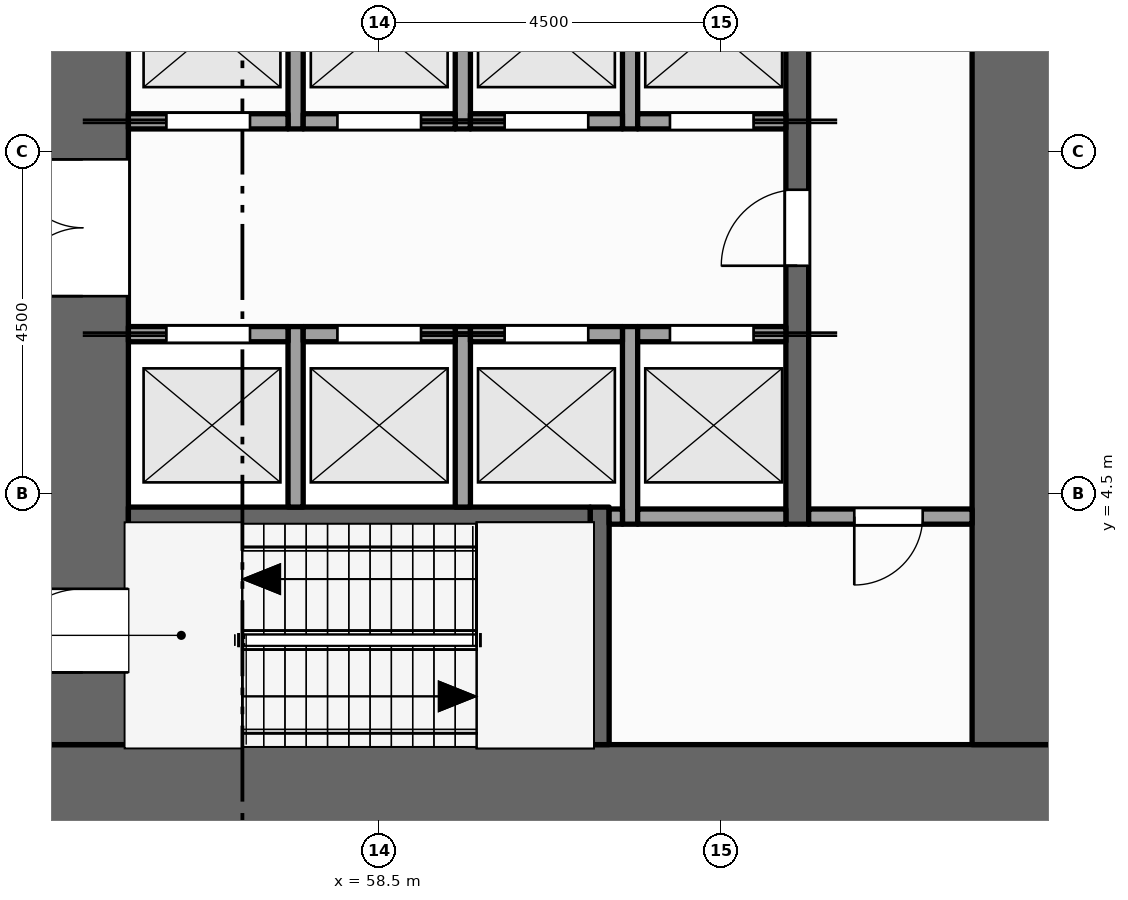
"""IFC4 building model, lengths in metres.
Left out: names, types, materials, properties, quantities, classifications, styles, units other than length and angle.
Written with IfcOpenShell. Run it as: python <this file> out.ifc"""

import sys

from ifc_helpers import new_model, si_unit, direction, frame, frame_2d, origin, place, context, subcontext, project, spatial, rectangle, extrude, element, fill, save


model = new_model("IFC4")
c1 = context("Model", 3, precision=1e-05, world=origin(), true_north=direction((0.0, 1.0)))
c2 = subcontext(c1, "Body", "Model", "MODEL_VIEW")
j1 = project(units=[si_unit("LENGTHUNIT", "METRE"), si_unit("PLANEANGLEUNIT", "RADIAN")], contexts=[c1])
p1 = place(None, origin())
s1 = spatial("IfcSite", under=j1, at=p1, CompositionType="ELEMENT")
p2 = place(p1, origin())
s2 = spatial("IfcBuilding", under=s1, at=p2, CompositionType="ELEMENT")
p3 = place(p2, frame((0.0, 0.0, 131.0)))
s3 = spatial("IfcBuildingStorey", under=s2, at=p3, CompositionType="ELEMENT", Elevation=131.0)
p4 = place(p3, frame((67.5, 0.6, -0.15), z_axis=(0.0, 0.0, 1.0), x_axis=(-1.0, 0.0, 0.0)))
e1 = element("IfcWall", 1, at=p4, inside=s3, PredefinedType="SHEAR", context=c2, shape_type="SweptSolid", body=[
    extrude(rectangle(XDim=13.5, YDim=1.2, at=frame_2d((6.75, 0.0))), origin(), (0.0, 0.0, 1.0), 8.0),
])
p5 = place(p3, frame((54.6, 1.2, -0.15), z_axis=(0.0, 0.0, 1.0), x_axis=(0.0, 1.0, 0.0)))
e2 = element("IfcWall", 2, at=p5, inside=s3, PredefinedType="SHEAR", context=c2, shape_type="SweptSolid", body=[
    extrude(rectangle(XDim=20.1, YDim=1.2, at=frame_2d((10.05, 0.0))), origin(), (0.0, 0.0, 1.0), 8.0),
])
p6 = place(p5, frame((5.9, 0.0, 0.15)))
e3 = element("IfcOpeningElement", 3, at=p6, cuts=e2, PredefinedType="OPENING", context=c2, shape_type="SweptSolid", body=[
    extrude(rectangle(XDim=1.8, YDim=2.1, at=frame_2d((0.9, 1.05))), frame((0.0, 0.61, 0.0), z_axis=(0.0, -1.0, 0.0), x_axis=(1.0, 0.0, 0.0)), (0.0, 0.0, 1.0), 1.22),
])
p7 = place(p5, frame((11.95, 0.0, 0.15)))
e4 = element("IfcOpeningElement", 4, at=p7, cuts=e2, PredefinedType="OPENING", context=c2, shape_type="SweptSolid", body=[
    extrude(rectangle(XDim=1.1, YDim=2.1, at=frame_2d((0.55, 1.05))), frame((0.0, 0.61, 0.0), z_axis=(0.0, -1.0, 0.0), x_axis=(1.0, 0.0, 0.0)), (0.0, 0.0, 1.0), 1.22),
])
p8 = place(p5, frame((0.95, 0.0, 0.15)))
e5 = element("IfcOpeningElement", 5, at=p8, cuts=e2, PredefinedType="OPENING", context=c2, shape_type="SweptSolid", body=[
    extrude(rectangle(XDim=1.1, YDim=2.1, at=frame_2d((0.55, 1.05))), frame((0.0, 0.61, 0.0), z_axis=(0.0, -1.0, 0.0), x_axis=(1.0, 0.0, 0.0)), (0.0, 0.0, 1.0), 1.22),
])
p9 = place(p5, frame((18.15, 0.0, 0.15)))
e6 = element("IfcOpeningElement", 6, at=p9, cuts=e2, PredefinedType="OPENING", context=c2, shape_type="SweptSolid", body=[
    extrude(rectangle(XDim=1.1, YDim=2.1, at=frame_2d((0.55, 1.05))), frame((0.0, 0.61, 0.0), z_axis=(0.0, -1.0, 0.0), x_axis=(1.0, 0.0, 0.0)), (0.0, 0.0, 1.0), 1.22),
])
p10 = place(p3, frame((66.9, 1.2, -0.15), z_axis=(0.0, 0.0, 1.0), x_axis=(0.0, 1.0, 0.0)))
e7 = element("IfcWall", 7, at=p10, inside=s3, PredefinedType="SHEAR", context=c2, shape_type="SweptSolid", body=[
    extrude(rectangle(XDim=20.1, YDim=1.2, at=frame_2d((10.05, 0.0))), origin(), (0.0, 0.0, 1.0), 8.0),
])
p11 = place(p3, frame((57.4, 4.325, 0.0), z_axis=(0.0, 0.0, 1.0), x_axis=(0.0, 1.0, 0.0)))
e8 = element("IfcWall", 8, at=p11, inside=s3, PredefinedType="SOLIDWALL", context=c2, shape_type="SweptSolid", body=[
    extrude(rectangle(XDim=2.375, YDim=0.2, at=frame_2d((1.188, 0.0))), origin(), (0.0, 0.0, 1.0), 7.85),
])
p12 = place(p3, frame((57.4, 9.3, 0.0), z_axis=(0.0, 0.0, 1.0), x_axis=(0.0, 1.0, 0.0)))
e9 = element("IfcWall", 9, at=p12, inside=s3, PredefinedType="SOLIDWALL", context=c2, shape_type="SweptSolid", body=[
    extrude(rectangle(XDim=2.6, YDim=0.2, at=frame_2d((1.3, 0.0))), origin(), (0.0, 0.0, 1.0), 7.85),
])
p13 = place(p3, frame((59.6, 4.325, 0.0), z_axis=(0.0, 0.0, 1.0), x_axis=(0.0, 1.0, 0.0)))
e10 = element("IfcWall", 10, at=p13, inside=s3, PredefinedType="SOLIDWALL", context=c2, shape_type="SweptSolid", body=[
    extrude(rectangle(XDim=2.375, YDim=0.2, at=frame_2d((1.188, 0.0))), origin(), (0.0, 0.0, 1.0), 7.85),
])
p14 = place(p3, frame((59.6, 9.3, 0.0), z_axis=(0.0, 0.0, 1.0), x_axis=(0.0, 1.0, 0.0)))
e11 = element("IfcWall", 11, at=p14, inside=s3, PredefinedType="SOLIDWALL", context=c2, shape_type="SweptSolid", body=[
    extrude(rectangle(XDim=2.6, YDim=0.2, at=frame_2d((1.3, 0.0))), origin(), (0.0, 0.0, 1.0), 7.85),
])
p15 = place(p3, frame((61.4, 1.2, 0.0), z_axis=(0.0, 0.0, 1.0), x_axis=(0.0, 1.0, 0.0)))
e12 = element("IfcWall", 12, at=p15, inside=s3, PredefinedType="SHEAR", context=c2, shape_type="SweptSolid", body=[
    extrude(rectangle(XDim=3.125, YDim=0.25, at=frame_2d((1.562, 0.0))), origin(), (0.0, 0.0, 1.0), 7.85),
])
for number, where, z_axis, x_axis in (
    (13, (61.8, 4.1, 0.0), (0.0, 0.0, 1.0), (0.0, 1.0, 0.0)),
    (14, (61.8, 9.3, 0.0), (0.0, 0.0, 1.0), (0.0, 1.0, 0.0)),
):
    element("IfcWall", number, at=place(p3, frame(where, z_axis=z_axis, x_axis=x_axis)), inside=s3, PredefinedType="SOLIDWALL", context=c2, shape_type="SweptSolid", body=[
        extrude(rectangle(XDim=2.6, YDim=0.2, at=frame_2d((1.3, 0.0))), origin(), (0.0, 0.0, 1.0), 7.85),
    ])
p16 = place(p3, frame((64.0, 4.1, 0.0), z_axis=(0.0, 0.0, 1.0), x_axis=(0.0, 1.0, 0.0)))
e15 = element("IfcWall", 15, at=p16, inside=s3, PredefinedType="SHEAR", context=c2, shape_type="SweptSolid", body=[
    extrude(rectangle(XDim=14.5, YDim=0.3, at=frame_2d((7.25, 0.0))), origin(), (0.0, 0.0, 1.0), 7.85),
])
p17 = place(p16, frame((3.4, 0.0, 0.0)))
e16 = element("IfcOpeningElement", 16, at=p17, cuts=e15, PredefinedType="OPENING", context=c2, shape_type="SweptSolid", body=[
    extrude(rectangle(XDim=1.0, YDim=2.1, at=frame_2d((0.5, 1.05))), frame((0.0, 0.16, 0.0), z_axis=(0.0, -1.0, 0.0), x_axis=(1.0, 0.0, 0.0)), (0.0, 0.0, 1.0), 0.32),
])
p18 = place(p16, frame((9.1, 0.0, 0.0)))
e17 = element("IfcOpeningElement", 17, at=p18, cuts=e15, PredefinedType="OPENING", context=c2, shape_type="SweptSolid", body=[
    extrude(rectangle(XDim=1.0, YDim=2.1, at=frame_2d((0.5, 1.05))), frame((0.0, 0.16, 0.0), z_axis=(0.0, -1.0, 0.0), x_axis=(1.0, 0.0, 0.0)), (0.0, 0.0, 1.0), 0.32),
])
p19 = place(p3, frame((55.2, 4.2, 0.0), z_axis=(0.0, 0.0, 1.0), x_axis=(1.0, 0.0, 0.0)))
e18 = element("IfcWall", 18, at=p19, inside=s3, PredefinedType="SHEAR", context=c2, shape_type="SweptSolid", body=[
    extrude(rectangle(XDim=6.075, YDim=0.25, at=frame_2d((3.038, 0.0))), origin(), (0.0, 0.0, 1.0), 7.85),
])
p20 = place(p3, frame((61.525, 4.2, 0.0), z_axis=(0.0, 0.0, 1.0), x_axis=(1.0, 0.0, 0.0)))
e19 = element("IfcWall", 19, at=p20, inside=s3, PredefinedType="SOLIDWALL", context=c2, shape_type="SweptSolid", body=[
    extrude(rectangle(XDim=0.175, YDim=0.2, at=frame_2d((0.087, 0.0))), origin(), (0.0, 0.0, 1.0), 7.85),
])
p21 = place(p3, frame((61.9, 4.2, 0.0), z_axis=(0.0, 0.0, 1.0), x_axis=(1.0, 0.0, 0.0)))
e20 = element("IfcWall", 20, at=p21, inside=s3, PredefinedType="SOLIDWALL", context=c2, shape_type="SweptSolid", body=[
    extrude(rectangle(XDim=1.95, YDim=0.2, at=frame_2d((0.975, 0.0))), origin(), (0.0, 0.0, 1.0), 7.85),
])
p22 = place(p3, frame((64.15, 4.2, 0.0), z_axis=(0.0, 0.0, 1.0), x_axis=(1.0, 0.0, 0.0)))
e21 = element("IfcWall", 21, at=p22, inside=s3, PredefinedType="PARTITIONING", context=c2, shape_type="SweptSolid", body=[
    extrude(rectangle(XDim=2.15, YDim=0.2, at=frame_2d((1.075, 0.0))), origin(), (0.0, 0.0, 1.0), 7.85),
])
p23 = place(p22, frame((0.6, 0.0, 0.0)))
e22 = element("IfcOpeningElement", 22, at=p23, cuts=e21, PredefinedType="OPENING", context=c2, shape_type="SweptSolid", body=[
    extrude(rectangle(XDim=0.9, YDim=2.1, at=frame_2d((0.45, 1.05))), frame((0.0, 0.11, 0.0), z_axis=(0.0, -1.0, 0.0), x_axis=(1.0, 0.0, 0.0)), (0.0, 0.0, 1.0), 0.22),
])
p24 = place(p3, frame((55.2, 6.6, 0.0), z_axis=(0.0, 0.0, 1.0), x_axis=(1.0, 0.0, 0.0)))
e23 = element("IfcWall", 23, at=p24, inside=s3, PredefinedType="SOLIDWALL", context=c2, shape_type="SweptSolid", body=[
    extrude(rectangle(XDim=2.1, YDim=0.2, at=frame_2d((1.05, 0.0))), origin(), (0.0, 0.0, 1.0), 7.85),
])
p25 = place(p24, frame((0.5, 0.0, 0.012)))
e24 = element("IfcOpeningElement", 24, at=p25, cuts=e23, PredefinedType="OPENING", context=c2, shape_type="SweptSolid", body=[
    extrude(rectangle(XDim=1.1, YDim=2.1, at=frame_2d((0.55, 1.05))), frame((0.0, 0.11, 0.0), z_axis=(0.0, -1.0, 0.0), x_axis=(1.0, 0.0, 0.0)), (0.0, 0.0, 1.0), 0.22),
])
p26 = place(p3, frame((57.5, 6.6, 0.0), z_axis=(0.0, 0.0, 1.0), x_axis=(1.0, 0.0, 0.0)))
e25 = element("IfcWall", 25, at=p26, inside=s3, PredefinedType="SOLIDWALL", context=c2, shape_type="SweptSolid", body=[
    extrude(rectangle(XDim=2.0, YDim=0.2, at=frame_2d((1.0, 0.0))), origin(), (0.0, 0.0, 1.0), 7.85),
])
p27 = place(p26, frame((0.45, 0.0, 0.012)))
e26 = element("IfcOpeningElement", 26, at=p27, cuts=e25, PredefinedType="OPENING", context=c2, shape_type="SweptSolid", body=[
    extrude(rectangle(XDim=1.1, YDim=2.1, at=frame_2d((0.55, 1.05))), frame((0.0, 0.11, 0.0), z_axis=(0.0, -1.0, 0.0), x_axis=(1.0, 0.0, 0.0)), (0.0, 0.0, 1.0), 0.22),
])
p28 = place(p3, frame((59.7, 6.6, 0.0), z_axis=(0.0, 0.0, 1.0), x_axis=(1.0, 0.0, 0.0)))
e27 = element("IfcWall", 27, at=p28, inside=s3, PredefinedType="SOLIDWALL", context=c2, shape_type="SweptSolid", body=[
    extrude(rectangle(XDim=2.0, YDim=0.2, at=frame_2d((1.0, 0.0))), origin(), (0.0, 0.0, 1.0), 7.85),
])
p29 = place(p28, frame((0.45, 0.0, 0.012)))
e28 = element("IfcOpeningElement", 28, at=p29, cuts=e27, PredefinedType="OPENING", context=c2, shape_type="SweptSolid", body=[
    extrude(rectangle(XDim=1.1, YDim=2.1, at=frame_2d((0.55, 1.05))), frame((0.0, 0.11, 0.0), z_axis=(0.0, -1.0, 0.0), x_axis=(1.0, 0.0, 0.0)), (0.0, 0.0, 1.0), 0.22),
])
p30 = place(p3, frame((61.9, 6.6, 0.0), z_axis=(0.0, 0.0, 1.0), x_axis=(1.0, 0.0, 0.0)))
e29 = element("IfcWall", 29, at=p30, inside=s3, PredefinedType="SOLIDWALL", context=c2, shape_type="SweptSolid", body=[
    extrude(rectangle(XDim=1.95, YDim=0.2, at=frame_2d((0.975, 0.0))), origin(), (0.0, 0.0, 1.0), 7.85),
])
p31 = place(p30, frame((0.425, 0.0, 0.012)))
e30 = element("IfcOpeningElement", 30, at=p31, cuts=e29, PredefinedType="OPENING", context=c2, shape_type="SweptSolid", body=[
    extrude(rectangle(XDim=1.1, YDim=2.1, at=frame_2d((0.55, 1.05))), frame((0.0, 0.11, 0.0), z_axis=(0.0, -1.0, 0.0), x_axis=(1.0, 0.0, 0.0)), (0.0, 0.0, 1.0), 0.22),
])
p32 = place(p3, frame((55.2, 9.4, 0.0), z_axis=(0.0, 0.0, 1.0), x_axis=(1.0, 0.0, 0.0)))
e31 = element("IfcWall", 31, at=p32, inside=s3, PredefinedType="SOLIDWALL", context=c2, shape_type="SweptSolid", body=[
    extrude(rectangle(XDim=2.1, YDim=0.2, at=frame_2d((1.05, 0.0))), origin(), (0.0, 0.0, 1.0), 7.85),
])
p33 = place(p32, frame((0.5, 0.0, 0.012)))
e32 = element("IfcOpeningElement", 32, at=p33, cuts=e31, PredefinedType="OPENING", context=c2, shape_type="SweptSolid", body=[
    extrude(rectangle(XDim=1.1, YDim=2.1, at=frame_2d((0.55, 1.05))), frame((0.0, 0.11, 0.0), z_axis=(0.0, -1.0, 0.0), x_axis=(1.0, 0.0, 0.0)), (0.0, 0.0, 1.0), 0.22),
])
p34 = place(p3, frame((57.5, 9.4, 0.0), z_axis=(0.0, 0.0, 1.0), x_axis=(1.0, 0.0, 0.0)))
e33 = element("IfcWall", 33, at=p34, inside=s3, PredefinedType="SOLIDWALL", context=c2, shape_type="SweptSolid", body=[
    extrude(rectangle(XDim=2.0, YDim=0.2, at=frame_2d((1.0, 0.0))), origin(), (0.0, 0.0, 1.0), 7.85),
])
p35 = place(p34, frame((0.45, 0.0, 0.012)))
e34 = element("IfcOpeningElement", 34, at=p35, cuts=e33, PredefinedType="OPENING", context=c2, shape_type="SweptSolid", body=[
    extrude(rectangle(XDim=1.1, YDim=2.1, at=frame_2d((0.55, 1.05))), frame((0.0, 0.11, 0.0), z_axis=(0.0, -1.0, 0.0), x_axis=(1.0, 0.0, 0.0)), (0.0, 0.0, 1.0), 0.22),
])
p36 = place(p3, frame((59.7, 9.4, 0.0), z_axis=(0.0, 0.0, 1.0), x_axis=(1.0, 0.0, 0.0)))
e35 = element("IfcWall", 35, at=p36, inside=s3, PredefinedType="SOLIDWALL", context=c2, shape_type="SweptSolid", body=[
    extrude(rectangle(XDim=2.0, YDim=0.2, at=frame_2d((1.0, 0.0))), origin(), (0.0, 0.0, 1.0), 7.85),
])
p37 = place(p36, frame((0.45, 0.0, 0.012)))
e36 = element("IfcOpeningElement", 36, at=p37, cuts=e35, PredefinedType="OPENING", context=c2, shape_type="SweptSolid", body=[
    extrude(rectangle(XDim=1.1, YDim=2.1, at=frame_2d((0.55, 1.05))), frame((0.0, 0.11, 0.0), z_axis=(0.0, -1.0, 0.0), x_axis=(1.0, 0.0, 0.0)), (0.0, 0.0, 1.0), 0.22),
])
p38 = place(p3, frame((61.9, 9.4, 0.0), z_axis=(0.0, 0.0, 1.0), x_axis=(1.0, 0.0, 0.0)))
e37 = element("IfcWall", 37, at=p38, inside=s3, PredefinedType="SOLIDWALL", context=c2, shape_type="SweptSolid", body=[
    extrude(rectangle(XDim=1.95, YDim=0.2, at=frame_2d((0.975, 0.0))), origin(), (0.0, 0.0, 1.0), 7.85),
])
p39 = place(p38, frame((0.425, 0.0, 0.012)))
e38 = element("IfcOpeningElement", 38, at=p39, cuts=e37, PredefinedType="OPENING", context=c2, shape_type="SweptSolid", body=[
    extrude(rectangle(XDim=1.1, YDim=2.1, at=frame_2d((0.55, 1.05))), frame((0.0, 0.11, 0.0), z_axis=(0.0, -1.0, 0.0), x_axis=(1.0, 0.0, 0.0)), (0.0, 0.0, 1.0), 0.22),
])
p40 = place(p25, origin())
e39 = element("IfcDoor", 39, at=p40, inside=s3, OperationType="SLIDING_TO_LEFT", PredefinedType="DOOR", context=c2, shape_type="SweptSolid", body=[
    extrude(rectangle(XDim=1.1, YDim=2.1, at=frame_2d((0.55, 1.05))), frame((0.0, 0.025, 0.0), z_axis=(0.0, -1.0, 0.0), x_axis=(1.0, 0.0, 0.0)), (0.0, 0.0, 1.0), 0.05),
])
fill(e24, e39)
p41 = place(p27, origin())
e40 = element("IfcDoor", 40, at=p41, inside=s3, OperationType="SLIDING_TO_RIGHT", PredefinedType="DOOR", context=c2, shape_type="SweptSolid", body=[
    extrude(rectangle(XDim=1.1, YDim=2.1, at=frame_2d((0.55, 1.05))), frame((0.0, 0.025, 0.0), z_axis=(0.0, -1.0, 0.0), x_axis=(1.0, 0.0, 0.0)), (0.0, 0.0, 1.0), 0.05),
])
fill(e26, e40)
p42 = place(p29, origin())
e41 = element("IfcDoor", 41, at=p42, inside=s3, OperationType="SLIDING_TO_LEFT", PredefinedType="DOOR", context=c2, shape_type="SweptSolid", body=[
    extrude(rectangle(XDim=1.1, YDim=2.1, at=frame_2d((0.55, 1.05))), frame((0.0, 0.025, 0.0), z_axis=(0.0, -1.0, 0.0), x_axis=(1.0, 0.0, 0.0)), (0.0, 0.0, 1.0), 0.05),
])
fill(e28, e41)
p43 = place(p31, origin())
e42 = element("IfcDoor", 42, at=p43, inside=s3, OperationType="SLIDING_TO_RIGHT", PredefinedType="DOOR", context=c2, shape_type="SweptSolid", body=[
    extrude(rectangle(XDim=1.1, YDim=2.1, at=frame_2d((0.55, 1.05))), frame((0.0, 0.025, 0.0), z_axis=(0.0, -1.0, 0.0), x_axis=(1.0, 0.0, 0.0)), (0.0, 0.0, 1.0), 0.05),
])
fill(e30, e42)
p44 = place(p33, origin())
e43 = element("IfcDoor", 43, at=p44, inside=s3, OperationType="SLIDING_TO_LEFT", PredefinedType="DOOR", context=c2, shape_type="SweptSolid", body=[
    extrude(rectangle(XDim=1.1, YDim=2.1, at=frame_2d((0.55, 1.05))), frame((0.0, 0.025, 0.0), z_axis=(0.0, -1.0, 0.0), x_axis=(1.0, 0.0, 0.0)), (0.0, 0.0, 1.0), 0.05),
])
fill(e32, e43)
p45 = place(p35, origin())
e44 = element("IfcDoor", 44, at=p45, inside=s3, OperationType="SLIDING_TO_RIGHT", PredefinedType="DOOR", context=c2, shape_type="SweptSolid", body=[
    extrude(rectangle(XDim=1.1, YDim=2.1, at=frame_2d((0.55, 1.05))), frame((0.0, 0.025, 0.0), z_axis=(0.0, -1.0, 0.0), x_axis=(1.0, 0.0, 0.0)), (0.0, 0.0, 1.0), 0.05),
])
fill(e34, e44)
p46 = place(p37, origin())
e45 = element("IfcDoor", 45, at=p46, inside=s3, OperationType="SLIDING_TO_LEFT", PredefinedType="DOOR", context=c2, shape_type="SweptSolid", body=[
    extrude(rectangle(XDim=1.1, YDim=2.1, at=frame_2d((0.55, 1.05))), frame((0.0, 0.025, 0.0), z_axis=(0.0, -1.0, 0.0), x_axis=(1.0, 0.0, 0.0)), (0.0, 0.0, 1.0), 0.05),
])
fill(e36, e45)
p47 = place(p39, origin())
e46 = element("IfcDoor", 46, at=p47, inside=s3, OperationType="SLIDING_TO_RIGHT", PredefinedType="DOOR", context=c2, shape_type="SweptSolid", body=[
    extrude(rectangle(XDim=1.1, YDim=2.1, at=frame_2d((0.55, 1.05))), frame((0.0, 0.025, 0.0), z_axis=(0.0, -1.0, 0.0), x_axis=(1.0, 0.0, 0.0)), (0.0, 0.0, 1.0), 0.05),
])
fill(e38, e46)
p48 = place(p6, origin())
e47 = element("IfcDoor", 47, at=p48, inside=s3, OperationType="DOUBLE_DOOR_SINGLE_SWING", PredefinedType="DOOR", context=c2, shape_type="SweptSolid", body=[
    extrude(rectangle(XDim=1.8, YDim=2.1, at=frame_2d((0.9, 1.05))), frame((0.0, 0.025, 0.0), z_axis=(0.0, -1.0, 0.0), x_axis=(1.0, 0.0, 0.0)), (0.0, 0.0, 1.0), 0.05),
])
fill(e3, e47)
p49 = place(p17, origin())
e48 = element("IfcDoor", 48, at=p49, inside=s3, OperationType="SINGLE_SWING_LEFT", PredefinedType="DOOR", context=c2, shape_type="SweptSolid", body=[
    extrude(rectangle(XDim=1.0, YDim=2.1, at=frame_2d((0.5, 1.05))), frame((0.0, 0.025, 0.0), z_axis=(0.0, -1.0, 0.0), x_axis=(1.0, 0.0, 0.0)), (0.0, 0.0, 1.0), 0.05),
])
fill(e16, e48)
p50 = place(p8, origin())
e49 = element("IfcDoor", 49, at=p50, inside=s3, OperationType="SINGLE_SWING_LEFT", PredefinedType="DOOR", context=c2, shape_type="SweptSolid", body=[
    extrude(rectangle(XDim=1.1, YDim=2.1, at=frame_2d((0.55, 1.05))), frame((0.0, 0.025, 0.0), z_axis=(0.0, -1.0, 0.0), x_axis=(1.0, 0.0, 0.0)), (0.0, 0.0, 1.0), 0.05),
])
fill(e5, e49)
p51 = place(p23, origin())
e50 = element("IfcDoor", 50, at=p51, inside=s3, OperationType="SINGLE_SWING_LEFT", PredefinedType="DOOR", context=c2, shape_type="SweptSolid", body=[
    extrude(rectangle(XDim=0.9, YDim=2.1, at=frame_2d((0.45, 1.05))), frame((0.0, 0.025, 0.0), z_axis=(0.0, -1.0, 0.0), x_axis=(1.0, 0.0, 0.0)), (0.0, 0.0, 1.0), 0.05),
])
fill(e22, e50)
save(model, sys.argv[1])
